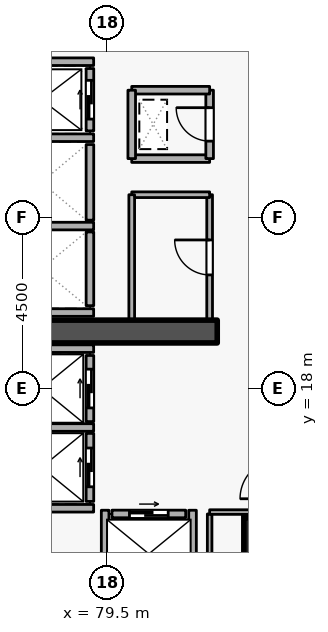
"""IFC4 building model, lengths in metres.
Left out: names, types, materials, properties, quantities, classifications, styles, units other than length and angle.
Written with IfcOpenShell. Run it as: python <this file> out.ifc"""

import sys

from ifc_helpers import new_model, si_unit, direction, frame, frame_2d, origin, origin_2d, place, context, subcontext, project, spatial, rectangle, extrude, element, fill, save


model = new_model("IFC4")
c1 = context("Model", 3, precision=1e-05, world=origin(), true_north=direction((0.0, 1.0)))
c2 = subcontext(c1, "Body", "Model", "MODEL_VIEW")
j1 = project(units=[si_unit("LENGTHUNIT", "METRE"), si_unit("PLANEANGLEUNIT", "RADIAN")], contexts=[c1])
p1 = place(None, origin())
s1 = spatial("IfcSite", under=j1, at=p1, CompositionType="ELEMENT")
p2 = place(p1, origin())
s2 = spatial("IfcBuilding", under=s1, at=p2, CompositionType="ELEMENT")
p3 = place(p2, frame((0.0, 0.0, 116.1)))
s3 = spatial("IfcBuildingStorey", under=s2, at=p3, CompositionType="ELEMENT", Elevation=116.1)
p4 = place(p3, frame((76.7, 19.5, 0.0), z_axis=(0.0, 0.0, 1.0), x_axis=(1.0, 0.0, 0.0)))
e1 = element("IfcWall", 1, at=p4, inside=s3, PredefinedType="SHEAR", context=c2, shape_type="SweptSolid", body=[
    extrude(rectangle(XDim=5.7, YDim=0.6, at=frame_2d((2.85, 0.0))), origin(), (0.0, 0.0, 1.0), 3.6),
])
p5 = place(p3, frame((83.7, 14.0, 0.0), z_axis=(0.0, 0.0, 1.0), x_axis=(1.0, 0.0, 0.0)))
e2 = element("IfcColumn", 2, at=p5, inside=s3, PredefinedType="COLUMN", context=c2, shape_type="SweptSolid", body=[
    extrude(rectangle(XDim=1.2, YDim=1.2, at=origin_2d()), origin(), (0.0, 0.0, 1.0), 3.6),
])
p6 = place(p3, frame((79.05, 24.78, 0.0), z_axis=(0.0, 0.0, 1.0), x_axis=(0.0, 1.0, 0.0)))
e3 = element("IfcWall", 3, at=p6, inside=s3, PredefinedType="STANDARD", context=c2, shape_type="SweptSolid", body=[
    extrude(rectangle(XDim=1.64, YDim=0.2, at=frame_2d((0.82, 0.0))), origin(), (0.0, 0.0, 1.0), 3.32),
])
p7 = place(p6, frame((0.31, 0.0, 0.0)))
e4 = element("IfcOpeningElement", 4, at=p7, cuts=e3, PredefinedType="OPENING", context=c2, shape_type="SweptSolid", body=[
    extrude(rectangle(XDim=1.02, YDim=2.06, at=frame_2d((0.51, 1.03))), frame((0.0, 0.11, 0.0), z_axis=(0.0, -1.0, 0.0), x_axis=(1.0, 0.0, 0.0)), (0.0, 0.0, 1.0), 0.22),
])
p8 = place(p3, frame((79.05, 22.43, 0.0), z_axis=(0.0, 0.0, 1.0), x_axis=(0.0, 1.0, 0.0)))
e5 = element("IfcWall", 5, at=p8, inside=s3, PredefinedType="STANDARD", context=c2, shape_type="SweptSolid", body=[
    extrude(rectangle(XDim=1.99, YDim=0.2, at=frame_2d((0.995, 0.0))), origin(), (0.0, 0.0, 1.0), 3.32),
])
p9 = place(p3, frame((79.05, 20.18, 0.0), z_axis=(0.0, 0.0, 1.0), x_axis=(0.0, 1.0, 0.0)))
e6 = element("IfcWall", 6, at=p9, inside=s3, PredefinedType="STANDARD", context=c2, shape_type="SweptSolid", body=[
    extrude(rectangle(XDim=1.94, YDim=0.2, at=frame_2d((0.97, 0.0))), origin(), (0.0, 0.0, 1.0), 3.32),
])
p10 = place(p3, frame((79.05, 17.13, 0.0), z_axis=(0.0, 0.0, 1.0), x_axis=(0.0, 1.0, 0.0)))
e7 = element("IfcWall", 7, at=p10, inside=s3, PredefinedType="STANDARD", context=c2, shape_type="SweptSolid", body=[
    extrude(rectangle(XDim=1.74, YDim=0.2, at=frame_2d((0.87, 0.0))), origin(), (0.0, 0.0, 1.0), 3.32),
])
p11 = place(p10, frame((0.36, 0.0, 0.0)))
e8 = element("IfcOpeningElement", 8, at=p11, cuts=e7, PredefinedType="OPENING", context=c2, shape_type="SweptSolid", body=[
    extrude(rectangle(XDim=1.02, YDim=2.06, at=frame_2d((0.51, 1.03))), frame((0.0, 0.11, 0.0), z_axis=(0.0, -1.0, 0.0), x_axis=(1.0, 0.0, 0.0)), (0.0, 0.0, 1.0), 0.22),
])
p12 = place(p3, frame((79.05, 15.03, 0.0), z_axis=(0.0, 0.0, 1.0), x_axis=(0.0, 1.0, 0.0)))
e9 = element("IfcWall", 9, at=p12, inside=s3, PredefinedType="STANDARD", context=c2, shape_type="SweptSolid", body=[
    extrude(rectangle(XDim=1.79, YDim=0.2, at=frame_2d((0.895, 0.0))), origin(), (0.0, 0.0, 1.0), 3.32),
])
p13 = place(p12, frame((0.385, 0.0, 0.0)))
e10 = element("IfcOpeningElement", 10, at=p13, cuts=e9, PredefinedType="OPENING", context=c2, shape_type="SweptSolid", body=[
    extrude(rectangle(XDim=1.02, YDim=2.06, at=frame_2d((0.51, 1.03))), frame((0.0, 0.11, 0.0), z_axis=(0.0, -1.0, 0.0), x_axis=(1.0, 0.0, 0.0)), (0.0, 0.0, 1.0), 0.22),
])
p14 = place(p3, frame((79.63, 14.7, 0.0), z_axis=(0.0, 0.0, 1.0), x_axis=(1.0, 0.0, 0.0)))
e11 = element("IfcWall", 11, at=p14, inside=s3, PredefinedType="STANDARD", context=c2, shape_type="SweptSolid", body=[
    extrude(rectangle(XDim=1.94, YDim=0.2, at=frame_2d((0.97, 0.0))), origin(), (0.0, 0.0, 1.0), 3.32),
])
p15 = place(p14, frame((0.46, 0.0, 0.0)))
e12 = element("IfcOpeningElement", 12, at=p15, cuts=e11, PredefinedType="OPENING", context=c2, shape_type="SweptSolid", body=[
    extrude(rectangle(XDim=1.02, YDim=2.06, at=frame_2d((0.51, 1.03))), frame((0.0, 0.11, 0.0), z_axis=(0.0, -1.0, 0.0), x_axis=(1.0, 0.0, 0.0)), (0.0, 0.0, 1.0), 0.22),
])
for number, where, z_axis, x_axis in (
    (13, (76.712, 26.6, 0.0), (0.0, 0.0, 1.0), (1.0, 0.0, 0.0)),
    (14, (76.712, 24.6, 0.0), (0.0, 0.0, 1.0), (1.0, 0.0, 0.0)),
    (15, (76.712, 22.275, 0.0), (0.0, 0.0, 1.0), (1.0, 0.0, 0.0)),
    (16, (76.712, 20.0, 0.0), (0.0, 0.0, 1.0), (1.0, 0.0, 0.0)),
):
    element("IfcWall", number, at=place(p3, frame(where, z_axis=z_axis, x_axis=x_axis)), inside=s3, PredefinedType="STANDARD", context=c2, shape_type="SweptSolid", body=[
        extrude(rectangle(XDim=2.436, YDim=0.2, at=frame_2d((1.218, 0.0))), origin(), (0.0, 0.0, 1.0), 3.32),
    ])
p16 = place(p3, frame((76.402, 19.05, 0.0), z_axis=(0.0, 0.0, 1.0), x_axis=(1.0, 0.0, 0.0)))
e17 = element("IfcWall", 17, at=p16, inside=s3, PredefinedType="STANDARD", context=c2, shape_type="SweptSolid", body=[
    extrude(rectangle(XDim=2.746, YDim=0.2, at=frame_2d((1.373, 0.0))), origin(), (0.0, 0.0, 1.0), 2.525),
])
p17 = place(p3, frame((76.402, 16.975, 0.0), z_axis=(0.0, 0.0, 1.0), x_axis=(1.0, 0.0, 0.0)))
e18 = element("IfcWall", 18, at=p17, inside=s3, PredefinedType="STANDARD", context=c2, shape_type="SweptSolid", body=[
    extrude(rectangle(XDim=2.746, YDim=0.2, at=frame_2d((1.373, 0.0))), origin(), (0.0, 0.0, 1.0), 3.32),
])
p18 = place(p3, frame((76.512, 14.85, 0.0), z_axis=(0.0, 0.0, 1.0), x_axis=(1.0, 0.0, 0.0)))
e19 = element("IfcWall", 19, at=p18, inside=s3, PredefinedType="STANDARD", context=c2, shape_type="SweptSolid", body=[
    extrude(rectangle(XDim=2.636, YDim=0.2, at=frame_2d((1.318, 0.0))), origin(), (0.0, 0.0, 1.0), 3.32),
])
for number, where, z_axis, x_axis in (
    (20, (81.75, 12.612, 0.0), (0.0, 0.0, 1.0), (0.0, 1.0, 0.0)),
    (21, (79.45, 12.612, 0.0), (0.0, 0.0, 1.0), (0.0, 1.0, 0.0)),
):
    element("IfcWall", number, at=place(p3, frame(where, z_axis=z_axis, x_axis=x_axis)), inside=s3, PredefinedType="STANDARD", context=c2, shape_type="SweptSolid", body=[
        extrude(rectangle(XDim=2.186, YDim=0.2, at=frame_2d((1.093, 0.0))), origin(), (0.0, 0.0, 1.0), 3.32),
    ])
p19 = place(p3, frame((80.15, 24.05, 0.0), z_axis=(0.0, 0.0, 1.0), x_axis=(1.0, 0.0, 0.0)))
e22 = element("IfcWall", 22, at=p19, inside=s3, PredefinedType="STANDARD", context=c2, shape_type="SweptSolid", body=[
    extrude(rectangle(XDim=2.05, YDim=0.2, at=frame_2d((1.025, 0.0))), origin(), (0.0, 0.0, 1.0), 3.32),
])
p20 = place(p3, frame((82.2, 24.05, 0.0), z_axis=(0.0, 0.0, 1.0), x_axis=(0.0, 1.0, 0.0)))
e23 = element("IfcWall", 23, at=p20, inside=s3, PredefinedType="STANDARD", context=c2, shape_type="SweptSolid", body=[
    extrude(rectangle(XDim=1.8, YDim=0.2, at=frame_2d((0.9, 0.0))), origin(), (0.0, 0.0, 1.0), 3.32),
])
p21 = place(p20, frame((0.46, 0.0, 0.0)))
e24 = element("IfcOpeningElement", 24, at=p21, cuts=e23, PredefinedType="OPENING", context=c2, shape_type="SweptSolid", body=[
    extrude(rectangle(XDim=0.88, YDim=2.04, at=frame_2d((0.44, 1.02))), frame((0.0, 0.11, 0.0), z_axis=(0.0, -1.0, 0.0), x_axis=(1.0, 0.0, 0.0)), (0.0, 0.0, 1.0), 0.22),
])
p22 = place(p3, frame((82.2, 25.85, 0.0), z_axis=(0.0, 0.0, 1.0), x_axis=(-1.0, 0.0, 0.0)))
e25 = element("IfcWall", 25, at=p22, inside=s3, PredefinedType="STANDARD", context=c2, shape_type="SweptSolid", body=[
    extrude(rectangle(XDim=2.05, YDim=0.2, at=frame_2d((1.025, 0.0))), origin(), (0.0, 0.0, 1.0), 3.32),
])
p23 = place(p3, frame((80.15, 25.85, 0.0), z_axis=(0.0, 0.0, 1.0), x_axis=(0.0, -1.0, 0.0)))
e26 = element("IfcWall", 26, at=p23, inside=s3, PredefinedType="STANDARD", context=c2, shape_type="SweptSolid", body=[
    extrude(rectangle(XDim=1.8, YDim=0.2, at=frame_2d((0.9, 0.0))), origin(), (0.0, 0.0, 1.0), 3.32),
])
p24 = place(p3, frame((82.2, 19.8, 0.0), z_axis=(0.0, 0.0, 1.0), x_axis=(0.0, 1.0, 0.0)))
e27 = element("IfcWall", 27, at=p24, inside=s3, PredefinedType="PARTITIONING", context=c2, shape_type="SweptSolid", body=[
    extrude(rectangle(XDim=3.3, YDim=0.15, at=frame_2d((1.65, 0.0))), origin(), (0.0, 0.0, 1.0), 3.32),
])
p25 = place(p24, frame((1.19, 0.0, 0.0)))
e28 = element("IfcOpeningElement", 28, at=p25, cuts=e27, PredefinedType="OPENING", context=c2, shape_type="SweptSolid", body=[
    extrude(rectangle(XDim=0.92, YDim=2.08, at=frame_2d((0.46, 1.04))), frame((0.0, 0.085, 0.0), z_axis=(0.0, -1.0, 0.0), x_axis=(1.0, 0.0, 0.0)), (0.0, 0.0, 1.0), 0.17),
])
p26 = place(p3, frame((82.2, 23.1, 0.0), z_axis=(0.0, 0.0, 1.0), x_axis=(-1.0, 0.0, 0.0)))
e29 = element("IfcWall", 29, at=p26, inside=s3, PredefinedType="PARTITIONING", context=c2, shape_type="SweptSolid", body=[
    extrude(rectangle(XDim=2.05, YDim=0.15, at=frame_2d((1.025, 0.0))), origin(), (0.0, 0.0, 1.0), 3.32),
])
p27 = place(p3, frame((80.15, 23.1, 0.0), z_axis=(0.0, 0.0, 1.0), x_axis=(0.0, -1.0, 0.0)))
e30 = element("IfcWall", 30, at=p27, inside=s3, PredefinedType="PARTITIONING", context=c2, shape_type="SweptSolid", body=[
    extrude(rectangle(XDim=3.3, YDim=0.15, at=frame_2d((1.65, 0.0))), origin(), (0.0, 0.0, 1.0), 3.32),
])
p28 = place(p3, frame((82.2, 12.4, 0.0), z_axis=(0.0, 0.0, 1.0), x_axis=(0.0, 1.0, 0.0)))
e31 = element("IfcWall", 31, at=p28, inside=s3, PredefinedType="PARTITIONING", context=c2, shape_type="SweptSolid", body=[
    extrude(rectangle(XDim=2.3, YDim=0.12, at=frame_2d((1.15, 0.0))), origin(), (0.0, 0.0, 1.0), 3.32),
])
p29 = place(p3, frame((82.2, 14.75, 0.0), z_axis=(0.0, 0.0, 1.0), x_axis=(1.0, 0.0, 0.0)))
e32 = element("IfcWall", 32, at=p29, inside=s3, PredefinedType="PARTITIONING", context=c2, shape_type="SweptSolid", body=[
    extrude(rectangle(XDim=1.85, YDim=0.12, at=frame_2d((0.925, 0.0))), origin(), (0.0, 0.0, 1.0), 3.32),
])
p30 = place(p7, origin())
e33 = element("IfcDoor", 33, at=p30, inside=s3, OperationType="SLIDING_TO_LEFT", PredefinedType="DOOR", context=c2, shape_type="SweptSolid", body=[
    extrude(rectangle(XDim=1.02, YDim=2.06, at=frame_2d((0.51, 1.03))), frame((0.0, 0.025, 0.0), z_axis=(0.0, -1.0, 0.0), x_axis=(1.0, 0.0, 0.0)), (0.0, 0.0, 1.0), 0.05),
])
fill(e4, e33)
p31 = place(p11, origin())
e34 = element("IfcDoor", 34, at=p31, inside=s3, OperationType="SLIDING_TO_LEFT", PredefinedType="DOOR", context=c2, shape_type="SweptSolid", body=[
    extrude(rectangle(XDim=1.02, YDim=2.06, at=frame_2d((0.51, 1.03))), frame((0.0, 0.025, 0.0), z_axis=(0.0, -1.0, 0.0), x_axis=(1.0, 0.0, 0.0)), (0.0, 0.0, 1.0), 0.05),
])
fill(e8, e34)
p32 = place(p13, origin())
e35 = element("IfcDoor", 35, at=p32, inside=s3, OperationType="SLIDING_TO_LEFT", PredefinedType="DOOR", context=c2, shape_type="SweptSolid", body=[
    extrude(rectangle(XDim=1.02, YDim=2.06, at=frame_2d((0.51, 1.03))), frame((0.0, 0.025, 0.0), z_axis=(0.0, -1.0, 0.0), x_axis=(1.0, 0.0, 0.0)), (0.0, 0.0, 1.0), 0.05),
])
fill(e10, e35)
p33 = place(p15, origin())
e36 = element("IfcDoor", 36, at=p33, inside=s3, OperationType="SLIDING_TO_LEFT", PredefinedType="DOOR", context=c2, shape_type="SweptSolid", body=[
    extrude(rectangle(XDim=1.02, YDim=2.06, at=frame_2d((0.51, 1.03))), frame((0.0, 0.025, 0.0), z_axis=(0.0, -1.0, 0.0), x_axis=(1.0, 0.0, 0.0)), (0.0, 0.0, 1.0), 0.05),
])
fill(e12, e36)
p34 = place(p21, origin())
e37 = element("IfcDoor", 37, at=p34, inside=s3, OperationType="SINGLE_SWING_RIGHT", PredefinedType="DOOR", context=c2, shape_type="SweptSolid", body=[
    extrude(rectangle(XDim=0.88, YDim=2.04, at=frame_2d((0.44, 1.02))), frame((0.0, 0.025, 0.0), z_axis=(0.0, -1.0, 0.0), x_axis=(1.0, 0.0, 0.0)), (0.0, 0.0, 1.0), 0.05),
])
fill(e24, e37)
p35 = place(p25, origin())
e38 = element("IfcDoor", 38, at=p35, inside=s3, OperationType="SINGLE_SWING_RIGHT", PredefinedType="DOOR", context=c2, shape_type="SweptSolid", body=[
    extrude(rectangle(XDim=0.92, YDim=2.08, at=frame_2d((0.46, 1.04))), frame((0.0, 0.025, 0.0), z_axis=(0.0, -1.0, 0.0), x_axis=(1.0, 0.0, 0.0)), (0.0, 0.0, 1.0), 0.05),
])
fill(e28, e38)
save(model, sys.argv[1])
